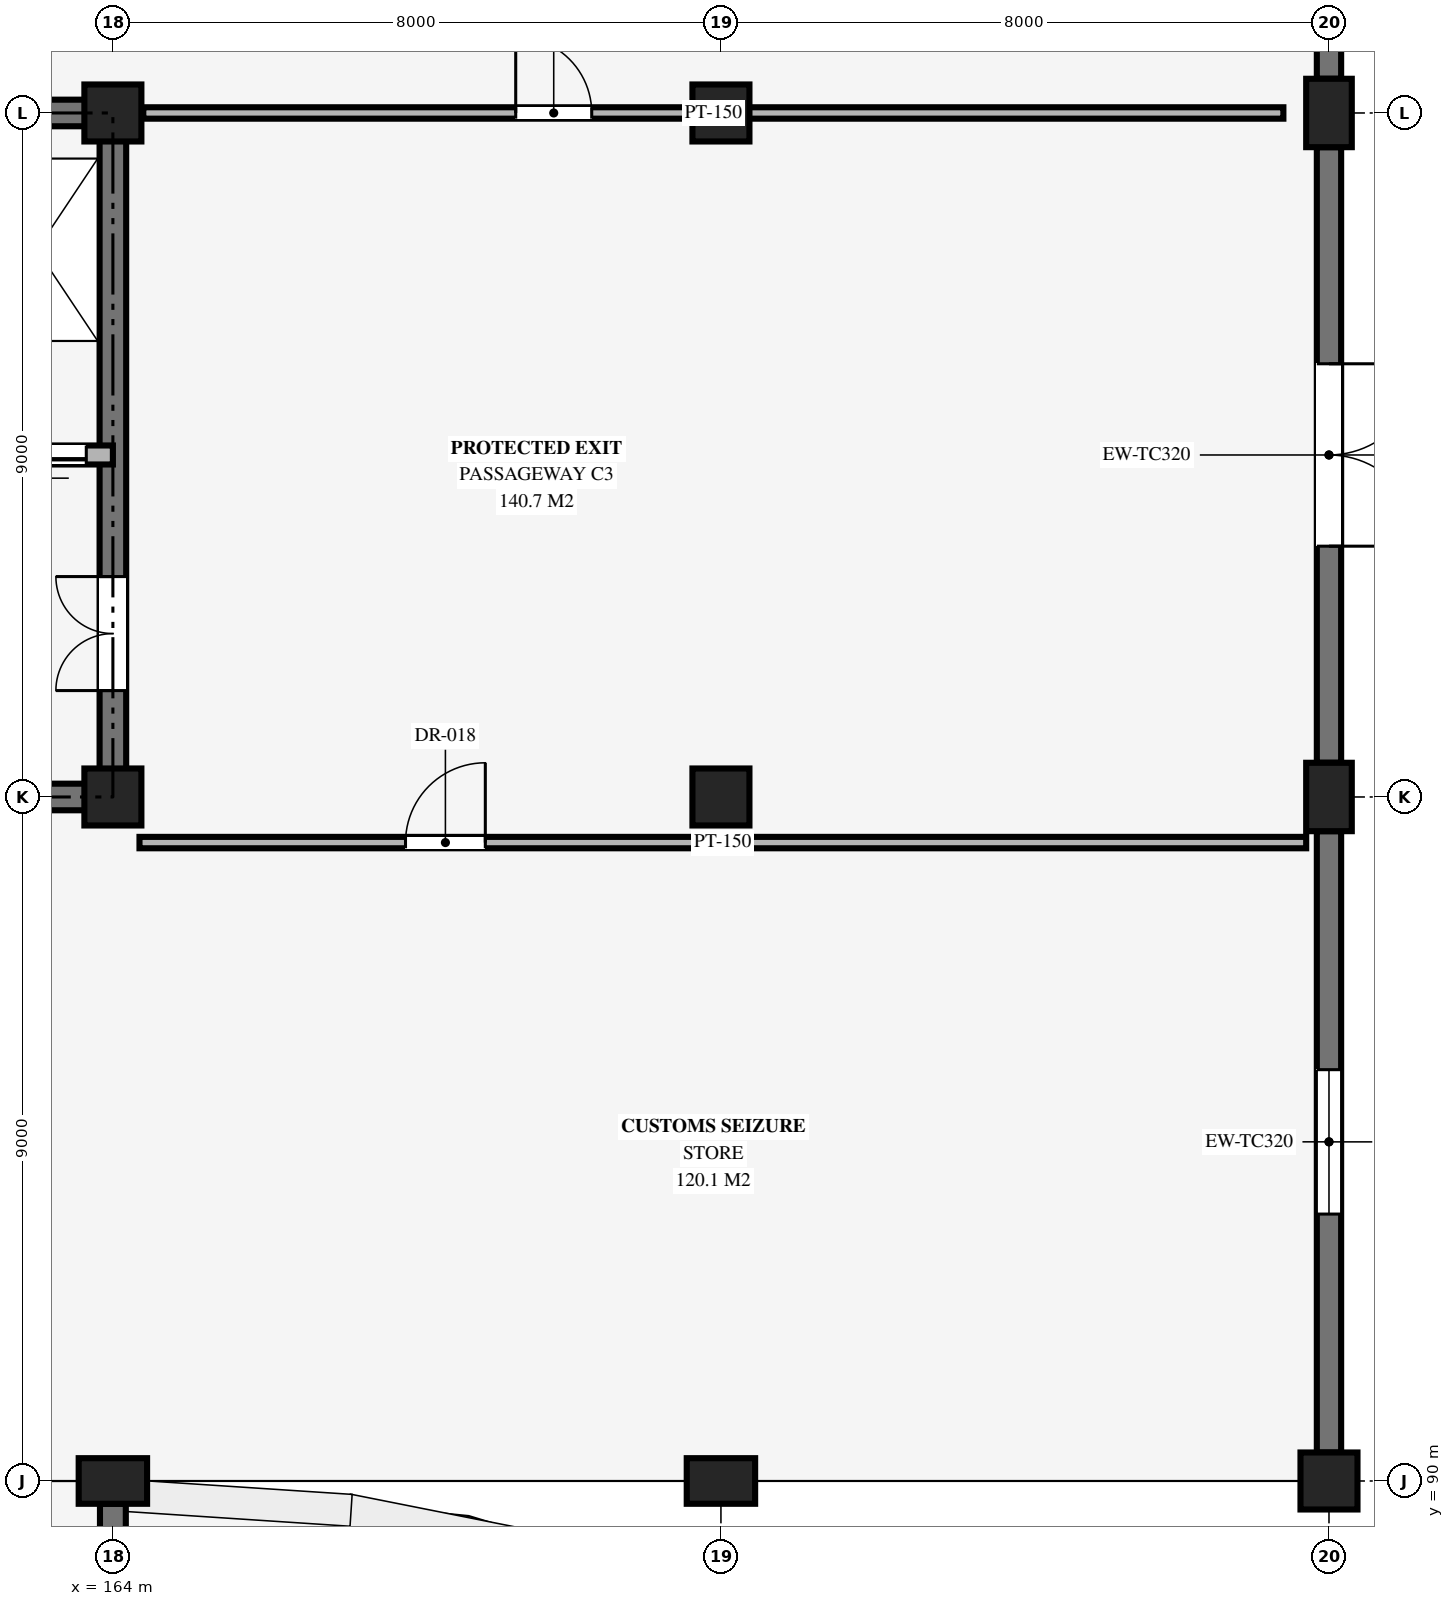
"""IFC4 building model, lengths in metres.
Left out: names, types, materials, properties, quantities, classifications, styles, units other than length and angle.
Written with IfcOpenShell. Run it as: python <this file> out.ifc"""

import sys

from ifc_helpers import new_model, si_unit, direction, frame, frame_2d, origin, origin_2d, place, context, subcontext, project, spatial, rectangle, extrude, element, fill, save


model = new_model("IFC4")
c1 = context("Model", 3, precision=1e-05, world=origin(), true_north=direction((0.0, 1.0)))
c2 = subcontext(c1, "Body", "Model", "MODEL_VIEW")
j1 = project(units=[si_unit("LENGTHUNIT", "METRE"), si_unit("PLANEANGLEUNIT", "RADIAN")], contexts=[c1])
p1 = place(None, origin())
s1 = spatial("IfcSite", under=j1, at=p1, CompositionType="ELEMENT")
p2 = place(p1, origin())
s2 = spatial("IfcBuilding", under=s1, at=p2, CompositionType="ELEMENT")
p3 = place(p2, origin())
s3 = spatial("IfcBuildingStorey", under=s2, at=p3, CompositionType="ELEMENT", Elevation=0.0)
p4 = place(p3, frame((164.0, 90.0, 0.0), z_axis=(0.0, 0.0, 1.0), x_axis=(0.0, 1.0, 0.0)))
e1 = element("IfcColumn", 1, at=p4, inside=s3, PredefinedType="PILASTER", context=c2, shape_type="SweptSolid", body=[
    extrude(rectangle(XDim=0.6, YDim=0.9, at=origin_2d()), origin(), (0.0, 0.0, 1.0), 5.24),
])
for number, where, z_axis, x_axis in (
    (2, (164.0, 99.0, 0.0), (0.0, 0.0, 1.0), (1.0, 0.0, 0.0)),
    (3, (164.0, 108.0, 0.0), (0.0, 0.0, 1.0), (1.0, 0.0, 0.0)),
):
    element("IfcColumn", number, at=place(p3, frame(where, z_axis=z_axis, x_axis=x_axis)), inside=s3, PredefinedType="COLUMN", context=c2, shape_type="SweptSolid", body=[
        extrude(rectangle(XDim=0.75, YDim=0.75, at=origin_2d()), origin(), (0.0, 0.0, 1.0), 5.24),
    ])
p5 = place(p3, frame((172.0, 90.0, 0.0), z_axis=(0.0, 0.0, 1.0), x_axis=(0.0, 1.0, 0.0)))
e4 = element("IfcColumn", 4, at=p5, inside=s3, PredefinedType="PILASTER", context=c2, shape_type="SweptSolid", body=[
    extrude(rectangle(XDim=0.6, YDim=0.9, at=origin_2d()), origin(), (0.0, 0.0, 1.0), 5.24),
])
for number, where, z_axis, x_axis in (
    (5, (172.0, 99.0, 0.0), (0.0, 0.0, 1.0), (1.0, 0.0, 0.0)),
    (6, (172.0, 108.0, 0.0), (0.0, 0.0, 1.0), (1.0, 0.0, 0.0)),
    (7, (180.0, 90.0, 0.0), (0.0, 0.0, 1.0), (1.0, 0.0, 0.0)),
):
    element("IfcColumn", number, at=place(p3, frame(where, z_axis=z_axis, x_axis=x_axis)), inside=s3, PredefinedType="COLUMN", context=c2, shape_type="SweptSolid", body=[
        extrude(rectangle(XDim=0.75, YDim=0.75, at=origin_2d()), origin(), (0.0, 0.0, 1.0), 5.24),
    ])
for number, where, z_axis, x_axis in (
    (8, (180.0, 99.0, 0.0), (0.0, 0.0, 1.0), (1.0, 0.0, 0.0)),
    (9, (180.0, 108.0, 0.0), (0.0, 0.0, 1.0), (1.0, 0.0, 0.0)),
):
    element("IfcColumn", number, at=place(p3, frame(where, z_axis=z_axis, x_axis=x_axis)), inside=s3, PredefinedType="PILASTER", context=c2, shape_type="SweptSolid", body=[
        extrude(rectangle(XDim=0.6, YDim=0.9, at=origin_2d()), origin(), (0.0, 0.0, 1.0), 5.24),
    ])
p6 = place(p3, frame((164.0, 88.65, 0.0), z_axis=(0.0, 0.0, 1.0), x_axis=(0.0, 1.0, 0.0)))
e10 = element("IfcWall", 10, at=p6, inside=s3, PredefinedType="SOLIDWALL", context=c2, shape_type="SweptSolid", body=[
    extrude(rectangle(XDim=1.05, YDim=0.34, at=frame_2d((0.525, 0.0))), origin(), (0.0, 0.0, 1.0), 5.06),
])
p7 = place(p3, frame((180.0, 90.375, 0.0), z_axis=(0.0, 0.0, 1.0), x_axis=(0.0, 1.0, 0.0)))
e11 = element("IfcWall", 11, at=p7, inside=s3, PredefinedType="SOLIDWALL", context=c2, shape_type="SweptSolid", body=[
    extrude(rectangle(XDim=8.175, YDim=0.32, at=frame_2d((4.087, 0.0))), origin(), (0.0, 0.0, 1.0), 5.06),
])
p8 = place(p7, frame((3.137, 0.0, 1.0)))
e12 = element("IfcOpeningElement", 12, at=p8, cuts=e11, PredefinedType="OPENING", context=c2, shape_type="SweptSolid", body=[
    extrude(rectangle(XDim=1.9, YDim=1.9, at=frame_2d((0.95, 0.95))), frame((0.0, 0.17, 0.0), z_axis=(0.0, -1.0, 0.0), x_axis=(1.0, 0.0, 0.0)), (0.0, 0.0, 1.0), 0.34),
])
p9 = place(p3, frame((180.0, 107.55, 0.0), z_axis=(0.0, 0.0, 1.0), x_axis=(0.0, -1.0, 0.0)))
e13 = element("IfcWall", 13, at=p9, inside=s3, PredefinedType="SOLIDWALL", context=c2, shape_type="SweptSolid", body=[
    extrude(rectangle(XDim=8.1, YDim=0.32, at=frame_2d((4.05, 0.0))), origin(), (0.0, 0.0, 1.0), 5.06),
])
p10 = place(p9, frame((2.85, 0.0, 0.0)))
e14 = element("IfcOpeningElement", 14, at=p10, cuts=e13, PredefinedType="OPENING", context=c2, shape_type="SweptSolid", body=[
    extrude(rectangle(XDim=2.4, YDim=2.3, at=frame_2d((1.2, 1.15))), frame((0.0, 0.17, 0.0), z_axis=(0.0, -1.0, 0.0), x_axis=(1.0, 0.0, 0.0)), (0.0, 0.0, 1.0), 0.34),
])
p11 = place(p3, frame((180.0, 108.45, 0.0), z_axis=(0.0, 0.0, 1.0), x_axis=(0.0, 1.0, 0.0)))
e15 = element("IfcWall", 15, at=p11, inside=s3, PredefinedType="SOLIDWALL", context=c2, shape_type="SweptSolid", body=[
    extrude(rectangle(XDim=8.1, YDim=0.32, at=frame_2d((4.05, 0.0))), origin(), (0.0, 0.0, 1.0), 5.06),
])
p12 = place(p11, frame((3.2, 0.0, 1.0)))
e16 = element("IfcOpeningElement", 16, at=p12, cuts=e15, PredefinedType="OPENING", context=c2, shape_type="SweptSolid", body=[
    extrude(rectangle(XDim=1.7, YDim=1.7, at=frame_2d((0.85, 0.85))), frame((0.0, 0.17, 0.0), z_axis=(0.0, -1.0, 0.0), x_axis=(1.0, 0.0, 0.0)), (0.0, 0.0, 1.0), 0.34),
])
for number, where, z_axis, x_axis in (
    (17, (156.0, 99.0, 0.0), (0.0, 0.0, 1.0), (1.0, 0.0, 0.0)),
    (18, (156.0, 108.0, 0.0), (0.0, 0.0, 1.0), (1.0, 0.0, 0.0)),
):
    element("IfcWall", number, at=place(p3, frame(where, z_axis=z_axis, x_axis=x_axis)), inside=s3, PredefinedType="SHEAR", context=c2, shape_type="SweptSolid", body=[
        extrude(rectangle(XDim=8.0, YDim=0.35, at=frame_2d((4.0, 0.0))), origin(), (0.0, 0.0, 1.0), 5.38),
    ])
p13 = place(p3, frame((164.0, 99.0, 0.0), z_axis=(0.0, 0.0, 1.0), x_axis=(0.0, 1.0, 0.0)))
e19 = element("IfcWall", 19, at=p13, inside=s3, PredefinedType="SHEAR", context=c2, shape_type="SweptSolid", body=[
    extrude(rectangle(XDim=9.0, YDim=0.35, at=frame_2d((4.5, 0.0))), origin(), (0.0, 0.0, 1.0), 5.38),
])
p14 = place(p13, frame((1.4, 0.0, 0.0)))
e20 = element("IfcOpeningElement", 20, at=p14, cuts=e19, PredefinedType="OPENING", context=c2, shape_type="SweptSolid", body=[
    extrude(rectangle(XDim=1.5, YDim=2.2, at=frame_2d((0.75, 1.1))), frame((0.0, 0.185, 0.0), z_axis=(0.0, -1.0, 0.0), x_axis=(1.0, 0.0, 0.0)), (0.0, 0.0, 1.0), 0.37),
])
p15 = place(p3, frame((164.0, 103.5, 0.0), z_axis=(0.0, 0.0, 1.0), x_axis=(-1.0, 0.0, 0.0)))
e21 = element("IfcWall", 21, at=p15, inside=s3, PredefinedType="SOLIDWALL", context=c2, shape_type="SweptSolid", body=[
    extrude(rectangle(XDim=4.0, YDim=0.25, at=frame_2d((2.0, 0.0))), origin(), (0.0, 0.0, 1.0), 4.2),
])
p16 = place(p15, frame((0.35, 0.0, 0.0)))
e22 = element("IfcOpeningElement", 22, at=p16, cuts=e21, PredefinedType="OPENING", context=c2, shape_type="SweptSolid", body=[
    extrude(rectangle(XDim=1.3, YDim=2.25, at=frame_2d((0.65, 1.125))), frame((0.0, 0.135, 0.0), z_axis=(0.0, -1.0, 0.0), x_axis=(1.0, 0.0, 0.0)), (0.0, 0.0, 1.0), 0.27),
])
p17 = place(p15, frame((2.25, 0.0, 0.0)))
e23 = element("IfcOpeningElement", 23, at=p17, cuts=e21, PredefinedType="OPENING", context=c2, shape_type="SweptSolid", body=[
    extrude(rectangle(XDim=1.2, YDim=2.2, at=frame_2d((0.6, 1.1))), frame((0.0, 0.135, 0.0), z_axis=(0.0, -1.0, 0.0), x_axis=(1.0, 0.0, 0.0)), (0.0, 0.0, 1.0), 0.27),
])
p18 = place(p3, frame((164.4, 108.0, 0.0), z_axis=(0.0, 0.0, 1.0), x_axis=(1.0, 0.0, 0.0)))
e24 = element("IfcWall", 24, at=p18, inside=s3, PredefinedType="PARTITIONING", context=c2, shape_type="SweptSolid", body=[
    extrude(rectangle(XDim=15.0, YDim=0.15, at=frame_2d((7.5, 0.0))), origin(), (0.0, 0.0, 1.0), 4.2),
])
p19 = place(p18, frame((4.9, 0.0, 0.0)))
e25 = element("IfcOpeningElement", 25, at=p19, cuts=e24, PredefinedType="OPENING", context=c2, shape_type="SweptSolid", body=[
    extrude(rectangle(XDim=1.0, YDim=2.15, at=frame_2d((0.5, 1.075))), frame((0.0, 0.085, 0.0), z_axis=(0.0, -1.0, 0.0), x_axis=(1.0, 0.0, 0.0)), (0.0, 0.0, 1.0), 0.17),
])
p20 = place(p3, frame((164.35, 98.4, 0.0), z_axis=(0.0, 0.0, 1.0), x_axis=(1.0, 0.0, 0.0)))
e26 = element("IfcWall", 26, at=p20, inside=s3, PredefinedType="PARTITIONING", context=c2, shape_type="SweptSolid", body=[
    extrude(rectangle(XDim=15.35, YDim=0.15, at=frame_2d((7.675, 0.0))), origin(), (0.0, 0.0, 1.0), 4.2),
])
p21 = place(p20, frame((3.5, 0.0, 0.0)))
e27 = element("IfcOpeningElement", 27, at=p21, cuts=e26, PredefinedType="OPENING", context=c2, shape_type="SweptSolid", body=[
    extrude(rectangle(XDim=1.05, YDim=2.15, at=frame_2d((0.525, 1.075))), frame((0.0, 0.085, 0.0), z_axis=(0.0, -1.0, 0.0), x_axis=(1.0, 0.0, 0.0)), (0.0, 0.0, 1.0), 0.17),
])
p22 = place(p8, origin())
e28 = element("IfcWindow", 28, at=p22, inside=s3, PartitioningType="SINGLE_PANEL", PredefinedType="WINDOW", context=c2, shape_type="SweptSolid", body=[
    extrude(rectangle(XDim=1.9, YDim=1.9, at=frame_2d((0.95, 0.95))), frame((0.0, 0.03, 0.0), z_axis=(0.0, -1.0, 0.0), x_axis=(1.0, 0.0, 0.0)), (0.0, 0.0, 1.0), 0.06),
])
fill(e12, e28)
p23 = place(p10, origin())
e29 = element("IfcDoor", 29, at=p23, inside=s3, OperationType="DOUBLE_DOOR_SINGLE_SWING", PredefinedType="DOOR", context=c2, shape_type="SweptSolid", body=[
    extrude(rectangle(XDim=2.4, YDim=2.3, at=frame_2d((1.2, 1.15))), frame((0.0, 0.025, 0.0), z_axis=(0.0, -1.0, 0.0), x_axis=(1.0, 0.0, 0.0)), (0.0, 0.0, 1.0), 0.05),
])
fill(e14, e29)
p24 = place(p16, origin())
e30 = element("IfcDoor", 30, at=p24, inside=s3, OperationType="DOUBLE_DOOR_SLIDING", PredefinedType="USERDEFINED", context=c2, shape_type="SweptSolid", body=[
    extrude(rectangle(XDim=1.3, YDim=2.25, at=frame_2d((0.65, 1.125))), frame((0.0, 0.025, 0.0), z_axis=(0.0, -1.0, 0.0), x_axis=(1.0, 0.0, 0.0)), (0.0, 0.0, 1.0), 0.05),
])
fill(e22, e30)
p25 = place(p14, origin())
e31 = element("IfcDoor", 31, at=p25, inside=s3, OperationType="DOUBLE_DOOR_SINGLE_SWING", PredefinedType="DOOR", context=c2, shape_type="SweptSolid", body=[
    extrude(rectangle(XDim=1.5, YDim=2.2, at=frame_2d((0.75, 1.1))), frame((0.0, 0.025, 0.0), z_axis=(0.0, -1.0, 0.0), x_axis=(1.0, 0.0, 0.0)), (0.0, 0.0, 1.0), 0.05),
])
fill(e20, e31)
p26 = place(p19, origin())
e32 = element("IfcDoor", 32, at=p26, inside=s3, OperationType="SINGLE_SWING_LEFT", PredefinedType="DOOR", context=c2, shape_type="SweptSolid", body=[
    extrude(rectangle(XDim=1.0, YDim=2.15, at=frame_2d((0.5, 1.075))), frame((0.0, 0.025, 0.0), z_axis=(0.0, -1.0, 0.0), x_axis=(1.0, 0.0, 0.0)), (0.0, 0.0, 1.0), 0.05),
])
fill(e25, e32)
p27 = place(p21, origin())
e33 = element("IfcDoor", 33, at=p27, inside=s3, OperationType="SINGLE_SWING_RIGHT", PredefinedType="DOOR", context=c2, shape_type="SweptSolid", body=[
    extrude(rectangle(XDim=1.05, YDim=2.15, at=frame_2d((0.525, 1.075))), frame((0.0, 0.025, 0.0), z_axis=(0.0, -1.0, 0.0), x_axis=(1.0, 0.0, 0.0)), (0.0, 0.0, 1.0), 0.05),
])
fill(e27, e33)
save(model, sys.argv[1])
